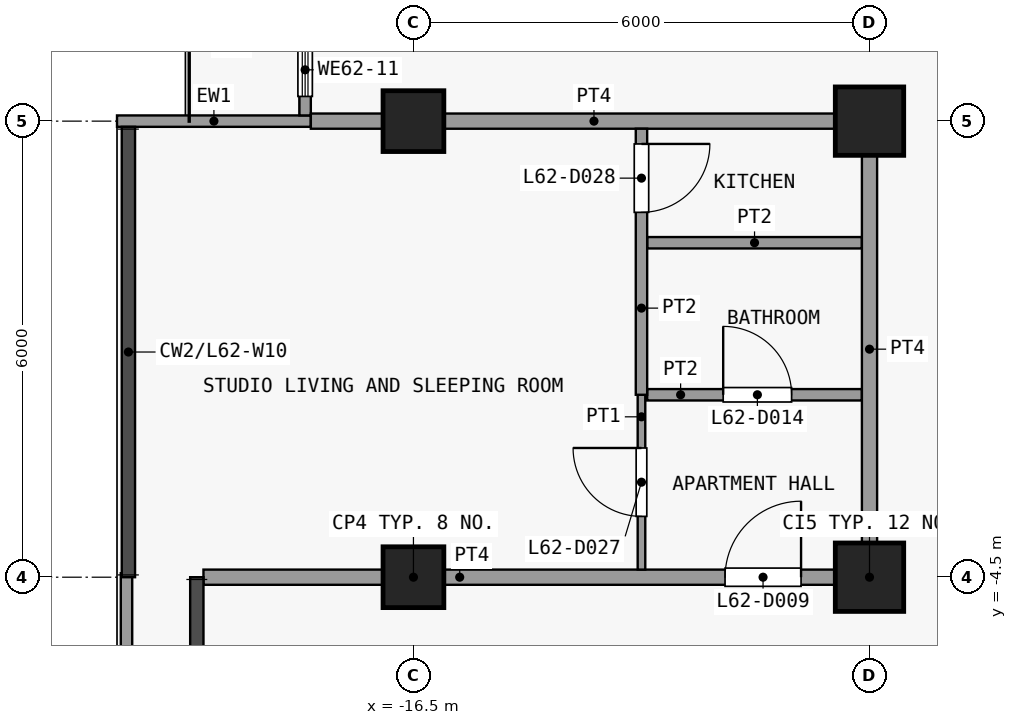
"""IFC4 building model, lengths in metres.
Left out: names, types, materials, properties, quantities, classifications, styles, units other than length and angle.
Written with IfcOpenShell. Run it as: python <this file> out.ifc"""

import sys

from ifc_helpers import new_model, si_unit, direction, frame, frame_2d, origin, origin_2d, place, context, subcontext, project, spatial, rectangle, extrude, element, fill, save


model = new_model("IFC4")
c1 = context("Model", 3, precision=1e-05, world=origin(), true_north=direction((0.0, 1.0)))
c2 = subcontext(c1, "Body", "Model", "MODEL_VIEW")
j1 = project(units=[si_unit("LENGTHUNIT", "METRE"), si_unit("PLANEANGLEUNIT", "RADIAN")], contexts=[c1])
p1 = place(None, origin())
s1 = spatial("IfcSite", under=j1, at=p1, CompositionType="ELEMENT")
p2 = place(p1, origin())
s2 = spatial("IfcBuilding", under=s1, at=p2, CompositionType="ELEMENT")
p3 = place(p2, frame((0.0, 0.0, 244.7)))
s3 = spatial("IfcBuildingStorey", under=s2, at=p3, CompositionType="ELEMENT", Elevation=244.7)
for number, where, z_axis, x_axis in (
    (1, (-16.5, -4.5, 0.0), (0.0, 0.0, 1.0), (1.0, 0.0, 0.0)),
    (2, (-16.5, 1.5, 0.0), (0.0, 0.0, 1.0), (1.0, 0.0, 0.0)),
):
    element("IfcColumn", number, at=place(p3, frame(where, z_axis=z_axis, x_axis=x_axis)), inside=s3, PredefinedType="COLUMN", context=c2, shape_type="SweptSolid", body=[
        extrude(rectangle(XDim=0.8, YDim=0.8, at=origin_2d()), origin(), (0.0, 0.0, 1.0), 3.6),
    ])
for number, where, z_axis, x_axis in (
    (3, (-10.5, -4.5, 0.0), (0.0, 0.0, 1.0), (1.0, 0.0, 0.0)),
    (4, (-10.5, 1.5, 0.0), (0.0, 0.0, 1.0), (1.0, 0.0, 0.0)),
):
    element("IfcColumn", number, at=place(p3, frame(where, z_axis=z_axis, x_axis=x_axis)), inside=s3, PredefinedType="COLUMN", context=c2, shape_type="SweptSolid", body=[
        extrude(rectangle(XDim=0.9, YDim=0.9, at=origin_2d()), origin(), (0.0, 0.0, 1.0), 3.6),
    ])
p4 = place(p3, frame((-17.85, 1.5, 0.0), z_axis=(0.0, 0.0, 1.0), x_axis=(-1.0, 0.0, 0.0)))
e5 = element("IfcWall", 5, at=p4, inside=s3, PredefinedType="SOLIDWALL", context=c2, shape_type="SweptSolid", body=[
    extrude(rectangle(XDim=2.55, YDim=0.15, at=frame_2d((1.275, 0.0))), origin(), (0.0, 0.0, 1.0), 3.15),
])
p5 = place(p3, frame((-17.925, 1.575, 0.0), z_axis=(0.0, 0.0, 1.0), x_axis=(0.0, 1.0, 0.0)))
e6 = element("IfcWall", 6, at=p5, inside=s3, PredefinedType="SOLIDWALL", context=c2, shape_type="SweptSolid", body=[
    extrude(rectangle(XDim=5.85, YDim=0.15, at=frame_2d((2.925, 0.0))), origin(), (0.0, 0.0, 1.0), 3.15),
])
p6 = place(p5, frame((1.2, 0.0, 0.0)))
e7 = element("IfcOpeningElement", 7, at=p6, cuts=e6, PredefinedType="OPENING", context=c2, shape_type="SweptSolid", body=[
    extrude(rectangle(XDim=1.2, YDim=2.4, at=frame_2d((0.6, 1.2))), frame((0.0, 0.085, 0.0), z_axis=(0.0, -1.0, 0.0), x_axis=(1.0, 0.0, 0.0)), (0.0, 0.0, 1.0), 0.17),
])
p7 = place(p5, frame((0.25, 0.0, 0.9)))
e8 = element("IfcOpeningElement", 8, at=p7, cuts=e6, PredefinedType="OPENING", context=c2, shape_type="SweptSolid", body=[
    extrude(rectangle(XDim=0.7, YDim=2.1, at=frame_2d((0.35, 1.05))), frame((0.0, 0.085, 0.0), z_axis=(0.0, -1.0, 0.0), x_axis=(1.0, 0.0, 0.0)), (0.0, 0.0, 1.0), 0.17),
])
p8 = place(p5, frame((3.225, 0.0, 0.9)))
e9 = element("IfcOpeningElement", 9, at=p8, cuts=e6, PredefinedType="OPENING", context=c2, shape_type="SweptSolid", body=[
    extrude(rectangle(XDim=1.8, YDim=2.1, at=frame_2d((0.9, 1.05))), frame((0.0, 0.085, 0.0), z_axis=(0.0, -1.0, 0.0), x_axis=(1.0, 0.0, 0.0)), (0.0, 0.0, 1.0), 0.17),
])
p9 = place(p3, frame((-20.275, -13.3, 0.0), z_axis=(0.0, 0.0, 1.0), x_axis=(0.0, 1.0, 0.0)))
e10 = element("IfcWall", 10, at=p9, inside=s3, PredefinedType="PARAPET", context=c2, shape_type="SweptSolid", body=[
    extrude(rectangle(XDim=8.853, YDim=0.15, at=frame_2d((4.426, 0.0))), origin(), (0.0, 0.0, 1.0), 1.15),
])
p10 = place(p3, frame((-19.262, -4.5, 0.0), z_axis=(0.0, 0.0, 1.0), x_axis=(1.0, 0.0, 0.0)))
e11 = element("IfcWall", 11, at=p10, inside=s3, PredefinedType="PARTITIONING", context=c2, shape_type="SweptSolid", body=[
    extrude(rectangle(XDim=8.863, YDim=0.2, at=frame_2d((4.431, 0.0))), origin(), (0.0, 0.0, 1.0), 3.15),
])
p11 = place(p10, frame((6.862, 0.0, 0.0)))
e12 = element("IfcOpeningElement", 12, at=p11, cuts=e11, PredefinedType="OPENING", context=c2, shape_type="SweptSolid", body=[
    extrude(rectangle(XDim=1.0, YDim=2.1, at=frame_2d((0.5, 1.05))), frame((0.0, 0.11, 0.0), z_axis=(0.0, -1.0, 0.0), x_axis=(1.0, 0.0, 0.0)), (0.0, 0.0, 1.0), 0.22),
])
p12 = place(p3, frame((-13.425, -2.1, 0.0), z_axis=(0.0, 0.0, 1.0), x_axis=(1.0, 0.0, 0.0)))
e13 = element("IfcWall", 13, at=p12, inside=s3, PredefinedType="PARTITIONING", context=c2, shape_type="SweptSolid", body=[
    extrude(rectangle(XDim=2.825, YDim=0.15, at=frame_2d((1.413, 0.0))), origin(), (0.0, 0.0, 1.0), 3.15),
])
p13 = place(p12, frame((1.0, 0.0, 0.0)))
e14 = element("IfcOpeningElement", 14, at=p13, cuts=e13, PredefinedType="OPENING", context=c2, shape_type="SweptSolid", body=[
    extrude(rectangle(XDim=0.9, YDim=2.1, at=frame_2d((0.45, 1.05))), frame((0.0, 0.085, 0.0), z_axis=(0.0, -1.0, 0.0), x_axis=(1.0, 0.0, 0.0)), (0.0, 0.0, 1.0), 0.17),
])
p14 = place(p3, frame((-13.425, -0.1, 0.0), z_axis=(0.0, 0.0, 1.0), x_axis=(1.0, 0.0, 0.0)))
e15 = element("IfcWall", 15, at=p14, inside=s3, PredefinedType="PARTITIONING", context=c2, shape_type="SweptSolid", body=[
    extrude(rectangle(XDim=2.825, YDim=0.15, at=frame_2d((1.413, 0.0))), origin(), (0.0, 0.0, 1.0), 3.15),
])
p15 = place(p3, frame((-17.85, 1.5, 0.0), z_axis=(0.0, 0.0, 1.0), x_axis=(1.0, 0.0, 0.0)))
e16 = element("IfcWall", 16, at=p15, inside=s3, PredefinedType="PARTITIONING", context=c2, shape_type="SweptSolid", body=[
    extrude(rectangle(XDim=7.45, YDim=0.2, at=frame_2d((3.725, 0.0))), origin(), (0.0, 0.0, 1.0), 3.15),
])
p16 = place(p3, frame((-13.5, -4.4, 0.0), z_axis=(0.0, 0.0, 1.0), x_axis=(0.0, 1.0, 0.0)))
e17 = element("IfcWall", 17, at=p16, inside=s3, PredefinedType="PARTITIONING", context=c2, shape_type="SweptSolid", body=[
    extrude(rectangle(XDim=2.3, YDim=0.1, at=frame_2d((1.15, 0.0))), origin(), (0.0, 0.0, 1.0), 3.15),
])
p17 = place(p16, frame((0.7, 0.0, 0.0)))
e18 = element("IfcOpeningElement", 18, at=p17, cuts=e17, PredefinedType="OPENING", context=c2, shape_type="SweptSolid", body=[
    extrude(rectangle(XDim=0.9, YDim=2.1, at=frame_2d((0.45, 1.05))), frame((0.0, 0.06, 0.0), z_axis=(0.0, -1.0, 0.0), x_axis=(1.0, 0.0, 0.0)), (0.0, 0.0, 1.0), 0.12),
])
p18 = place(p3, frame((-13.5, -2.1, 0.0), z_axis=(0.0, 0.0, 1.0), x_axis=(0.0, 1.0, 0.0)))
e19 = element("IfcWall", 19, at=p18, inside=s3, PredefinedType="PARTITIONING", context=c2, shape_type="SweptSolid", body=[
    extrude(rectangle(XDim=3.5, YDim=0.15, at=frame_2d((1.75, 0.0))), origin(), (0.0, 0.0, 1.0), 3.15),
])
p19 = place(p18, frame((2.4, 0.0, 0.0)))
e20 = element("IfcOpeningElement", 20, at=p19, cuts=e19, PredefinedType="OPENING", context=c2, shape_type="SweptSolid", body=[
    extrude(rectangle(XDim=0.9, YDim=2.1, at=frame_2d((0.45, 1.05))), frame((0.0, 0.085, 0.0), z_axis=(0.0, -1.0, 0.0), x_axis=(1.0, 0.0, 0.0)), (0.0, 0.0, 1.0), 0.17),
])
p20 = place(p3, frame((-10.5, -4.4, 0.0), z_axis=(0.0, 0.0, 1.0), x_axis=(0.0, 1.0, 0.0)))
e21 = element("IfcWall", 21, at=p20, inside=s3, PredefinedType="PARTITIONING", context=c2, shape_type="SweptSolid", body=[
    extrude(rectangle(XDim=5.8, YDim=0.2, at=frame_2d((2.9, 0.0))), origin(), (0.0, 0.0, 1.0), 3.15),
])
p21 = place(p7, origin())
e22 = element("IfcWindow", 22, at=p21, inside=s3, PartitioningType="SINGLE_PANEL", PredefinedType="WINDOW", context=c2, shape_type="SweptSolid", body=[
    extrude(rectangle(XDim=0.7, YDim=2.1, at=frame_2d((0.35, 1.05))), frame((0.0, 0.03, 0.0), z_axis=(0.0, -1.0, 0.0), x_axis=(1.0, 0.0, 0.0)), (0.0, 0.0, 1.0), 0.06),
])
fill(e8, e22)
p22 = place(p11, origin())
e23 = element("IfcDoor", 23, at=p22, inside=s3, OperationType="SINGLE_SWING_LEFT", PredefinedType="DOOR", context=c2, shape_type="SweptSolid", body=[
    extrude(rectangle(XDim=1.0, YDim=2.1, at=frame_2d((0.5, 1.05))), frame((0.0, 0.025, 0.0), z_axis=(0.0, -1.0, 0.0), x_axis=(1.0, 0.0, 0.0)), (0.0, 0.0, 1.0), 0.05),
])
fill(e12, e23)
p23 = place(p13, origin())
e24 = element("IfcDoor", 24, at=p23, inside=s3, OperationType="SINGLE_SWING_RIGHT", PredefinedType="DOOR", context=c2, shape_type="SweptSolid", body=[
    extrude(rectangle(XDim=0.9, YDim=2.1, at=frame_2d((0.45, 1.05))), frame((0.0, 0.025, 0.0), z_axis=(0.0, -1.0, 0.0), x_axis=(1.0, 0.0, 0.0)), (0.0, 0.0, 1.0), 0.05),
])
fill(e14, e24)
p24 = place(p17, origin())
e25 = element("IfcDoor", 25, at=p24, inside=s3, OperationType="SINGLE_SWING_LEFT", PredefinedType="DOOR", context=c2, shape_type="SweptSolid", body=[
    extrude(rectangle(XDim=0.9, YDim=2.1, at=frame_2d((0.45, 1.05))), frame((0.0, 0.025, 0.0), z_axis=(0.0, -1.0, 0.0), x_axis=(1.0, 0.0, 0.0)), (0.0, 0.0, 1.0), 0.05),
])
fill(e18, e25)
p25 = place(p19, origin())
e26 = element("IfcDoor", 26, at=p25, inside=s3, OperationType="SINGLE_SWING_RIGHT", PredefinedType="DOOR", context=c2, shape_type="SweptSolid", body=[
    extrude(rectangle(XDim=0.9, YDim=2.1, at=frame_2d((0.45, 1.05))), frame((0.0, 0.025, 0.0), z_axis=(0.0, -1.0, 0.0), x_axis=(1.0, 0.0, 0.0)), (0.0, 0.0, 1.0), 0.05),
])
fill(e20, e26)
save(model, sys.argv[1])
